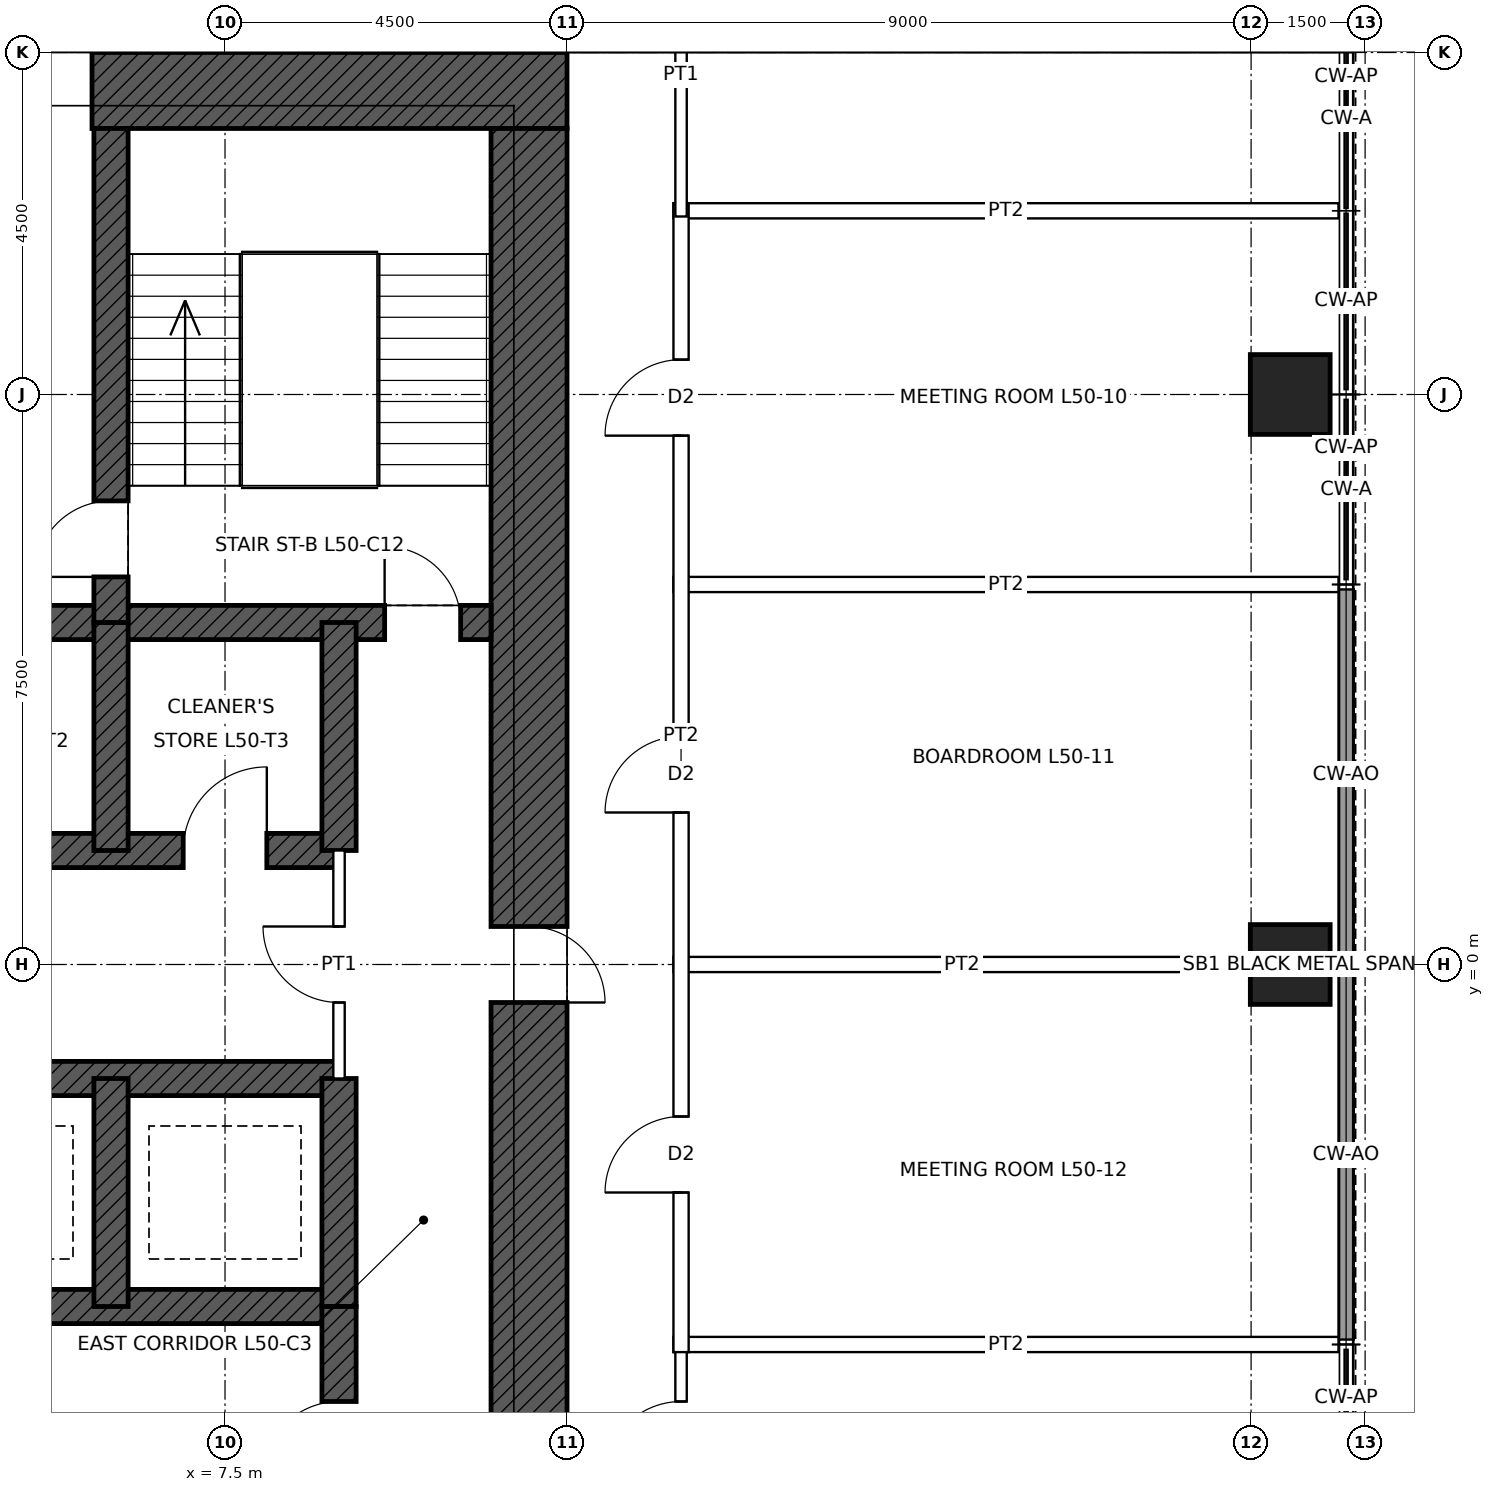
"""IFC4 building model, lengths in metres.
Left out: names, types, materials, properties, quantities, classifications, styles, units other than length and angle.
Written with IfcOpenShell. Run it as: python <this file> out.ifc"""

import sys

from ifc_helpers import new_model, si_unit, direction, frame, frame_2d, origin, origin_2d, place, context, subcontext, project, spatial, rectangle, hollow_rectangle, extrude, element, fill, save


model = new_model("IFC4")
c1 = context("Model", 3, precision=1e-05, world=origin(), true_north=direction((0.0, 1.0)))
c2 = subcontext(c1, "Body", "Model", "MODEL_VIEW")
j1 = project(units=[si_unit("LENGTHUNIT", "METRE"), si_unit("PLANEANGLEUNIT", "RADIAN")], contexts=[c1])
p1 = place(None, origin())
s1 = spatial("IfcSite", under=j1, at=p1, CompositionType="ELEMENT")
p2 = place(p1, origin())
s2 = spatial("IfcBuilding", under=s1, at=p2, CompositionType="ELEMENT")
p3 = place(p2, frame((0.0, 0.0, 233.9)))
s3 = spatial("IfcBuildingStorey", under=s2, at=p3, CompositionType="ELEMENT", Elevation=233.9)
for number, where, z_axis, x_axis in (
    (1, (21.515, 7.5, 0.0), (0.0, 0.0, 1.0), (1.0, 0.0, 0.0)),
    (2, (21.515, 0.0, 0.0), (0.0, 0.0, 1.0), (1.0, 0.0, 0.0)),
):
    element("IfcColumn", number, at=place(p3, frame(where, z_axis=z_axis, x_axis=x_axis)), inside=s3, PredefinedType="COLUMN", context=c2, shape_type="SweptSolid", body=[
        extrude(hollow_rectangle(XDim=1.05, YDim=1.05, WallThickness=0.07, at=origin_2d()), origin(), (0.0, 0.0, 1.0), 4.0),
    ])
p4 = place(p3, frame((-12.0, 11.5, 0.0), z_axis=(0.0, 0.0, 1.0), x_axis=(1.0, 0.0, 0.0)))
e3 = element("IfcWall", 3, at=p4, inside=s3, PredefinedType="SHEAR", context=c2, shape_type="SweptSolid", body=[
    extrude(rectangle(XDim=24.0, YDim=1.0, at=frame_2d((12.0, 0.0))), origin(), (0.0, 0.0, 1.0), 4.0),
])
p5 = place(p4, frame((6.25, 0.0, 0.0)))
e4 = element("IfcOpeningElement", 4, at=p5, cuts=e3, PredefinedType="OPENING", context=c2, shape_type="SweptSolid", body=[
    extrude(rectangle(XDim=1.0, YDim=2.4, at=frame_2d((0.5, 1.2))), frame((0.0, 0.51, 0.0), z_axis=(0.0, -1.0, 0.0), x_axis=(1.0, 0.0, 0.0)), (0.0, 0.0, 1.0), 1.02),
])
p6 = place(p4, frame((16.75, 0.0, 0.0)))
e5 = element("IfcOpeningElement", 5, at=p6, cuts=e3, PredefinedType="OPENING", context=c2, shape_type="SweptSolid", body=[
    extrude(rectangle(XDim=1.0, YDim=2.4, at=frame_2d((0.5, 1.2))), frame((0.0, 0.51, 0.0), z_axis=(0.0, -1.0, 0.0), x_axis=(1.0, 0.0, 0.0)), (0.0, 0.0, 1.0), 1.02),
])
p7 = place(p3, frame((11.5, 11.0, 0.0), z_axis=(0.0, 0.0, 1.0), x_axis=(0.0, -1.0, 0.0)))
e6 = element("IfcWall", 6, at=p7, inside=s3, PredefinedType="SHEAR", context=c2, shape_type="SweptSolid", body=[
    extrude(rectangle(XDim=22.0, YDim=1.0, at=frame_2d((11.0, 0.0))), origin(), (0.0, 0.0, 1.0), 4.0),
])
p8 = place(p7, frame((10.5, 0.0, 0.0)))
e7 = element("IfcOpeningElement", 7, at=p8, cuts=e6, PredefinedType="OPENING", context=c2, shape_type="SweptSolid", body=[
    extrude(rectangle(XDim=1.0, YDim=2.4, at=frame_2d((0.5, 1.2))), frame((0.0, 0.51, 0.0), z_axis=(0.0, -1.0, 0.0), x_axis=(1.0, 0.0, 0.0)), (0.0, 0.0, 1.0), 1.02),
])
p9 = place(p3, frame((-11.0, 4.5, 0.0), z_axis=(0.0, 0.0, 1.0), x_axis=(1.0, 0.0, 0.0)))
e8 = element("IfcWall", 8, at=p9, inside=s3, PredefinedType="SHEAR", context=c2, shape_type="SweptSolid", body=[
    extrude(rectangle(XDim=22.0, YDim=0.45, at=frame_2d((11.0, 0.0))), origin(), (0.0, 0.0, 1.0), 4.0),
])
p10 = place(p9, frame((0.4, 0.0, 0.0)))
e9 = element("IfcOpeningElement", 9, at=p10, cuts=e8, PredefinedType="OPENING", context=c2, shape_type="SweptSolid", body=[
    extrude(rectangle(XDim=1.0, YDim=2.1, at=frame_2d((0.5, 1.05))), frame((0.0, 0.235, 0.0), z_axis=(0.0, -1.0, 0.0), x_axis=(1.0, 0.0, 0.0)), (0.0, 0.0, 1.0), 0.47),
])
p11 = place(p9, frame((20.6, 0.0, 0.0)))
e10 = element("IfcOpeningElement", 10, at=p11, cuts=e8, PredefinedType="OPENING", context=c2, shape_type="SweptSolid", body=[
    extrude(rectangle(XDim=1.0, YDim=2.1, at=frame_2d((0.5, 1.05))), frame((0.0, 0.235, 0.0), z_axis=(0.0, -1.0, 0.0), x_axis=(1.0, 0.0, 0.0)), (0.0, 0.0, 1.0), 0.47),
])
p12 = place(p3, frame((-9.0, 1.5, 0.0), z_axis=(0.0, 0.0, 1.0), x_axis=(1.0, 0.0, 0.0)))
e11 = element("IfcWall", 11, at=p12, inside=s3, PredefinedType="SHEAR", context=c2, shape_type="SweptSolid", body=[
    extrude(rectangle(XDim=18.0, YDim=0.45, at=frame_2d((9.0, 0.0))), origin(), (0.0, 0.0, 1.0), 4.0),
])
p13 = place(p12, frame((0.95, 0.0, 0.0)))
e12 = element("IfcOpeningElement", 12, at=p13, cuts=e11, PredefinedType="OPENING", context=c2, shape_type="SweptSolid", body=[
    extrude(rectangle(XDim=1.1, YDim=2.1, at=frame_2d((0.55, 1.05))), frame((0.0, 0.235, 0.0), z_axis=(0.0, -1.0, 0.0), x_axis=(1.0, 0.0, 0.0)), (0.0, 0.0, 1.0), 0.47),
])
p14 = place(p12, frame((3.95, 0.0, 0.0)))
e13 = element("IfcOpeningElement", 13, at=p14, cuts=e11, PredefinedType="OPENING", context=c2, shape_type="SweptSolid", body=[
    extrude(rectangle(XDim=1.1, YDim=2.1, at=frame_2d((0.55, 1.05))), frame((0.0, 0.235, 0.0), z_axis=(0.0, -1.0, 0.0), x_axis=(1.0, 0.0, 0.0)), (0.0, 0.0, 1.0), 0.47),
])
p15 = place(p12, frame((6.95, 0.0, 0.0)))
e14 = element("IfcOpeningElement", 14, at=p15, cuts=e11, PredefinedType="OPENING", context=c2, shape_type="SweptSolid", body=[
    extrude(rectangle(XDim=1.1, YDim=2.1, at=frame_2d((0.55, 1.05))), frame((0.0, 0.235, 0.0), z_axis=(0.0, -1.0, 0.0), x_axis=(1.0, 0.0, 0.0)), (0.0, 0.0, 1.0), 0.47),
])
p16 = place(p12, frame((9.95, 0.0, 0.0)))
e15 = element("IfcOpeningElement", 15, at=p16, cuts=e11, PredefinedType="OPENING", context=c2, shape_type="SweptSolid", body=[
    extrude(rectangle(XDim=1.1, YDim=2.1, at=frame_2d((0.55, 1.05))), frame((0.0, 0.235, 0.0), z_axis=(0.0, -1.0, 0.0), x_axis=(1.0, 0.0, 0.0)), (0.0, 0.0, 1.0), 0.47),
])
p17 = place(p12, frame((12.95, 0.0, 0.0)))
e16 = element("IfcOpeningElement", 16, at=p17, cuts=e11, PredefinedType="OPENING", context=c2, shape_type="SweptSolid", body=[
    extrude(rectangle(XDim=1.1, YDim=2.1, at=frame_2d((0.55, 1.05))), frame((0.0, 0.235, 0.0), z_axis=(0.0, -1.0, 0.0), x_axis=(1.0, 0.0, 0.0)), (0.0, 0.0, 1.0), 0.47),
])
p18 = place(p12, frame((15.95, 0.0, 0.0)))
e17 = element("IfcOpeningElement", 17, at=p18, cuts=e11, PredefinedType="OPENING", context=c2, shape_type="SweptSolid", body=[
    extrude(rectangle(XDim=1.1, YDim=2.1, at=frame_2d((0.55, 1.05))), frame((0.0, 0.235, 0.0), z_axis=(0.0, -1.0, 0.0), x_axis=(1.0, 0.0, 0.0)), (0.0, 0.0, 1.0), 0.47),
])
p19 = place(p3, frame((-9.0, -1.5, 0.0), z_axis=(0.0, 0.0, 1.0), x_axis=(1.0, 0.0, 0.0)))
e18 = element("IfcWall", 18, at=p19, inside=s3, PredefinedType="SHEAR", context=c2, shape_type="SweptSolid", body=[
    extrude(rectangle(XDim=18.0, YDim=0.45, at=frame_2d((9.0, 0.0))), origin(), (0.0, 0.0, 1.0), 4.0),
])
p20 = place(p19, frame((0.95, 0.0, 0.0)))
e19 = element("IfcOpeningElement", 19, at=p20, cuts=e18, PredefinedType="OPENING", context=c2, shape_type="SweptSolid", body=[
    extrude(rectangle(XDim=1.1, YDim=2.1, at=frame_2d((0.55, 1.05))), frame((0.0, 0.235, 0.0), z_axis=(0.0, -1.0, 0.0), x_axis=(1.0, 0.0, 0.0)), (0.0, 0.0, 1.0), 0.47),
])
p21 = place(p19, frame((3.95, 0.0, 0.0)))
e20 = element("IfcOpeningElement", 20, at=p21, cuts=e18, PredefinedType="OPENING", context=c2, shape_type="SweptSolid", body=[
    extrude(rectangle(XDim=1.1, YDim=2.1, at=frame_2d((0.55, 1.05))), frame((0.0, 0.235, 0.0), z_axis=(0.0, -1.0, 0.0), x_axis=(1.0, 0.0, 0.0)), (0.0, 0.0, 1.0), 0.47),
])
p22 = place(p19, frame((6.95, 0.0, 0.0)))
e21 = element("IfcOpeningElement", 21, at=p22, cuts=e18, PredefinedType="OPENING", context=c2, shape_type="SweptSolid", body=[
    extrude(rectangle(XDim=1.1, YDim=2.1, at=frame_2d((0.55, 1.05))), frame((0.0, 0.235, 0.0), z_axis=(0.0, -1.0, 0.0), x_axis=(1.0, 0.0, 0.0)), (0.0, 0.0, 1.0), 0.47),
])
p23 = place(p3, frame((-9.0, -4.5, 0.0), z_axis=(0.0, 0.0, 1.0), x_axis=(1.0, 0.0, 0.0)))
e22 = element("IfcWall", 22, at=p23, inside=s3, PredefinedType="SHEAR", context=c2, shape_type="SweptSolid", body=[
    extrude(rectangle(XDim=18.0, YDim=0.45, at=frame_2d((9.0, 0.0))), origin(), (0.0, 0.0, 1.0), 4.0),
])
for number, where, z_axis, x_axis in (
    (23, (9.0, 1.5, 0.0), (0.0, 0.0, 1.0), (0.0, 1.0, 0.0)),
    (24, (9.0, -4.5, 0.0), (0.0, 0.0, 1.0), (0.0, 1.0, 0.0)),
    (25, (6.0, 1.5, 0.0), (0.0, 0.0, 1.0), (0.0, 1.0, 0.0)),
    (26, (6.0, -4.5, 0.0), (0.0, 0.0, 1.0), (0.0, 1.0, 0.0)),
):
    element("IfcWall", number, at=place(p3, frame(where, z_axis=z_axis, x_axis=x_axis)), inside=s3, PredefinedType="SHEAR", context=c2, shape_type="SweptSolid", body=[
        extrude(rectangle(XDim=3.0, YDim=0.45, at=frame_2d((1.5, 0.0))), origin(), (0.0, 0.0, 1.0), 4.0),
    ])
p24 = place(p3, frame((6.0, 4.5, 0.0), z_axis=(0.0, 0.0, 1.0), x_axis=(0.0, 1.0, 0.0)))
e27 = element("IfcWall", 27, at=p24, inside=s3, PredefinedType="SHEAR", context=c2, shape_type="SweptSolid", body=[
    extrude(rectangle(XDim=6.5, YDim=0.45, at=frame_2d((3.25, 0.0))), origin(), (0.0, 0.0, 1.0), 4.0),
])
p25 = place(p24, frame((0.6, 0.0, 0.0)))
e28 = element("IfcOpeningElement", 28, at=p25, cuts=e27, PredefinedType="OPENING", context=c2, shape_type="SweptSolid", body=[
    extrude(rectangle(XDim=1.0, YDim=2.1, at=frame_2d((0.5, 1.05))), frame((0.0, 0.235, 0.0), z_axis=(0.0, -1.0, 0.0), x_axis=(1.0, 0.0, 0.0)), (0.0, 0.0, 1.0), 0.47),
])
p26 = place(p3, frame((9.0, -11.0, 0.0), z_axis=(0.0, 0.0, 1.0), x_axis=(0.0, 1.0, 0.0)))
e29 = element("IfcWall", 29, at=p26, inside=s3, PredefinedType="SHEAR", context=c2, shape_type="SweptSolid", body=[
    extrude(rectangle(XDim=6.5, YDim=0.45, at=frame_2d((3.25, 0.0))), origin(), (0.0, 0.0, 1.0), 4.0),
])
p27 = place(p26, frame((4.25, 0.0, 0.0)))
e30 = element("IfcOpeningElement", 30, at=p27, cuts=e29, PredefinedType="OPENING", context=c2, shape_type="SweptSolid", body=[
    extrude(rectangle(XDim=1.0, YDim=2.1, at=frame_2d((0.5, 1.05))), frame((0.0, 0.235, 0.0), z_axis=(0.0, -1.0, 0.0), x_axis=(1.0, 0.0, 0.0)), (0.0, 0.0, 1.0), 0.47),
])
for number, where, z_axis, x_axis in (
    (31, (22.25, 4.935, 0.0), (0.0, 0.0, 1.0), (0.0, -1.0, 0.0)),
    (32, (22.25, 2.468, 0.0), (0.0, 0.0, 1.0), (0.0, -1.0, 0.0)),
    (33, (22.25, -0.065, 0.0), (0.0, 0.0, 1.0), (0.0, -1.0, 0.0)),
    (34, (22.25, -2.532, 0.0), (0.0, 0.0, 1.0), (0.0, -1.0, 0.0)),
):
    element("IfcWall", number, at=place(p3, frame(where, z_axis=z_axis, x_axis=x_axis)), inside=s3, PredefinedType="SOLIDWALL", context=c2, shape_type="SweptSolid", body=[
        extrude(rectangle(XDim=2.403, YDim=0.2, at=frame_2d((1.201, 0.0))), origin(), (0.0, 0.0, 1.0), 3.85),
    ])
p28 = place(p3, frame((13.4, -5.0, 0.0), z_axis=(0.0, 0.0, 1.0), x_axis=(1.0, 0.0, 0.0)))
e35 = element("IfcWall", 35, at=p28, inside=s3, PredefinedType="PARTITIONING", context=c2, shape_type="SweptSolid", body=[
    extrude(rectangle(XDim=8.75, YDim=0.2, at=frame_2d((4.375, 0.0))), origin(), (0.0, 0.0, 1.0), 3.85),
])
p29 = place(p3, frame((13.4, 0.0, 0.0), z_axis=(0.0, 0.0, 1.0), x_axis=(1.0, 0.0, 0.0)))
e36 = element("IfcWall", 36, at=p29, inside=s3, PredefinedType="PARTITIONING", context=c2, shape_type="SweptSolid", body=[
    extrude(rectangle(XDim=7.59, YDim=0.2, at=frame_2d((3.795, 0.0))), origin(), (0.0, 0.0, 1.0), 3.238),
])
for number, where, z_axis, x_axis in (
    (37, (13.4, 5.0, 0.0), (0.0, 0.0, 1.0), (1.0, 0.0, 0.0)),
    (38, (13.4, 9.917, 0.0), (0.0, 0.0, 1.0), (1.0, 0.0, 0.0)),
):
    element("IfcWall", number, at=place(p3, frame(where, z_axis=z_axis, x_axis=x_axis)), inside=s3, PredefinedType="PARTITIONING", context=c2, shape_type="SweptSolid", body=[
        extrude(rectangle(XDim=8.75, YDim=0.2, at=frame_2d((4.375, 0.0))), origin(), (0.0, 0.0, 1.0), 3.85),
    ])
p30 = place(p3, frame((13.5, -13.575, 0.0), z_axis=(0.0, 0.0, 1.0), x_axis=(0.0, 1.0, 0.0)))
e39 = element("IfcWall", 39, at=p30, inside=s3, PredefinedType="PARTITIONING", context=c2, shape_type="SweptSolid", body=[
    extrude(rectangle(XDim=8.65, YDim=0.15, at=frame_2d((4.325, 0.0))), origin(), (0.0, 0.0, 1.0), 3.85),
])
p31 = place(p30, frame((6.825, 0.0, 0.0)))
e40 = element("IfcOpeningElement", 40, at=p31, cuts=e39, PredefinedType="OPENING", context=c2, shape_type="SweptSolid", body=[
    extrude(rectangle(XDim=1.0, YDim=2.1, at=frame_2d((0.5, 1.05))), frame((0.0, 0.085, 0.0), z_axis=(0.0, -1.0, 0.0), x_axis=(1.0, 0.0, 0.0)), (0.0, 0.0, 1.0), 0.17),
])
p32 = place(p30, frame((4.366, 0.0, 0.0)))
e41 = element("IfcOpeningElement", 41, at=p32, cuts=e39, PredefinedType="OPENING", context=c2, shape_type="SweptSolid", body=[
    extrude(rectangle(XDim=1.0, YDim=2.1, at=frame_2d((0.5, 1.05))), frame((0.0, 0.085, 0.0), z_axis=(0.0, -1.0, 0.0), x_axis=(1.0, 0.0, 0.0)), (0.0, 0.0, 1.0), 0.17),
])
p33 = place(p3, frame((13.5, -5.1, 0.0), z_axis=(0.0, 0.0, 1.0), x_axis=(0.0, 1.0, 0.0)))
e42 = element("IfcWall", 42, at=p33, inside=s3, PredefinedType="PARTITIONING", context=c2, shape_type="SweptSolid", body=[
    extrude(rectangle(XDim=15.117, YDim=0.2, at=frame_2d((7.559, 0.0))), origin(), (0.0, 0.0, 1.0), 3.85),
])
p34 = place(p33, frame((12.059, 0.0, 0.0)))
e43 = element("IfcOpeningElement", 43, at=p34, cuts=e42, PredefinedType="OPENING", context=c2, shape_type="SweptSolid", body=[
    extrude(rectangle(XDim=1.0, YDim=2.1, at=frame_2d((0.5, 1.05))), frame((0.0, 0.11, 0.0), z_axis=(0.0, -1.0, 0.0), x_axis=(1.0, 0.0, 0.0)), (0.0, 0.0, 1.0), 0.22),
])
p35 = place(p33, frame((7.1, 0.0, 0.0)))
e44 = element("IfcOpeningElement", 44, at=p35, cuts=e42, PredefinedType="OPENING", context=c2, shape_type="SweptSolid", body=[
    extrude(rectangle(XDim=1.0, YDim=2.1, at=frame_2d((0.5, 1.05))), frame((0.0, 0.11, 0.0), z_axis=(0.0, -1.0, 0.0), x_axis=(1.0, 0.0, 0.0)), (0.0, 0.0, 1.0), 0.22),
])
p36 = place(p33, frame((2.1, 0.0, 0.0)))
e45 = element("IfcOpeningElement", 45, at=p36, cuts=e42, PredefinedType="OPENING", context=c2, shape_type="SweptSolid", body=[
    extrude(rectangle(XDim=1.0, YDim=2.1, at=frame_2d((0.5, 1.05))), frame((0.0, 0.11, 0.0), z_axis=(0.0, -1.0, 0.0), x_axis=(1.0, 0.0, 0.0)), (0.0, 0.0, 1.0), 0.22),
])
p37 = place(p3, frame((13.5, 9.842, 0.0), z_axis=(0.0, 0.0, 1.0), x_axis=(0.0, 1.0, 0.0)))
e46 = element("IfcWall", 46, at=p37, inside=s3, PredefinedType="PARTITIONING", context=c2, shape_type="SweptSolid", body=[
    extrude(rectangle(XDim=3.733, YDim=0.15, at=frame_2d((1.866, 0.0))), origin(), (0.0, 0.0, 1.0), 3.85),
])
p38 = place(p3, frame((9.0, -1.5, 0.0), z_axis=(0.0, 0.0, 1.0), x_axis=(0.0, 1.0, 0.0)))
e47 = element("IfcWall", 47, at=p38, inside=s3, PredefinedType="PARTITIONING", context=c2, shape_type="SweptSolid", body=[
    extrude(rectangle(XDim=3.0, YDim=0.15, at=frame_2d((1.5, 0.0))), origin(), (0.0, 0.0, 1.0), 3.75),
])
p39 = place(p38, frame((1.0, 0.0, 0.0)))
e48 = element("IfcOpeningElement", 48, at=p39, cuts=e47, PredefinedType="OPENING", context=c2, shape_type="SweptSolid", body=[
    extrude(rectangle(XDim=1.0, YDim=2.4, at=frame_2d((0.5, 1.2))), frame((0.0, 0.085, 0.0), z_axis=(0.0, -1.0, 0.0), x_axis=(1.0, 0.0, 0.0)), (0.0, 0.0, 1.0), 0.17),
])
p40 = place(p11, origin())
e49 = element("IfcDoor", 49, at=p40, inside=s3, OperationType="SINGLE_SWING_LEFT", PredefinedType="DOOR", context=c2, shape_type="SweptSolid", body=[
    extrude(rectangle(XDim=1.0, YDim=2.1, at=frame_2d((0.5, 1.05))), frame((0.0, 0.025, 0.0), z_axis=(0.0, -1.0, 0.0), x_axis=(1.0, 0.0, 0.0)), (0.0, 0.0, 1.0), 0.05),
])
fill(e10, e49)
p41 = place(p25, origin())
e50 = element("IfcDoor", 50, at=p41, inside=s3, OperationType="SINGLE_SWING_LEFT", PredefinedType="DOOR", context=c2, shape_type="SweptSolid", body=[
    extrude(rectangle(XDim=1.0, YDim=2.1, at=frame_2d((0.5, 1.05))), frame((0.0, 0.025, 0.0), z_axis=(0.0, -1.0, 0.0), x_axis=(1.0, 0.0, 0.0)), (0.0, 0.0, 1.0), 0.05),
])
fill(e28, e50)
p42 = place(p6, origin())
e51 = element("IfcDoor", 51, at=p42, inside=s3, OperationType="SINGLE_SWING_RIGHT", PredefinedType="DOOR", context=c2, shape_type="SweptSolid", body=[
    extrude(rectangle(XDim=1.0, YDim=2.4, at=frame_2d((0.5, 1.2))), frame((0.0, 0.485, 0.0), z_axis=(0.0, -1.0, 0.0), x_axis=(1.0, 0.0, 0.0)), (0.0, 0.0, 1.0), 0.05),
])
fill(e5, e51)
p43 = place(p8, origin())
e52 = element("IfcDoor", 52, at=p43, inside=s3, OperationType="SINGLE_SWING_RIGHT", PredefinedType="DOOR", context=c2, shape_type="SweptSolid", body=[
    extrude(rectangle(XDim=1.0, YDim=2.4, at=frame_2d((0.5, 1.2))), frame((0.0, 0.485, 0.0), z_axis=(0.0, -1.0, 0.0), x_axis=(1.0, 0.0, 0.0)), (0.0, 0.0, 1.0), 0.05),
])
fill(e7, e52)
p44 = place(p27, origin())
e53 = element("IfcDoor", 53, at=p44, inside=s3, OperationType="SINGLE_SWING_LEFT", PredefinedType="DOOR", context=c2, shape_type="SweptSolid", body=[
    extrude(rectangle(XDim=1.0, YDim=2.1, at=frame_2d((0.5, 1.05))), frame((0.0, 0.025, 0.0), z_axis=(0.0, -1.0, 0.0), x_axis=(1.0, 0.0, 0.0)), (0.0, 0.0, 1.0), 0.05),
])
fill(e30, e53)
p45 = place(p39, origin())
e54 = element("IfcDoor", 54, at=p45, inside=s3, OperationType="SINGLE_SWING_RIGHT", PredefinedType="DOOR", context=c2, shape_type="SweptSolid", body=[
    extrude(rectangle(XDim=1.0, YDim=2.4, at=frame_2d((0.5, 1.2))), frame((0.0, 0.025, 0.0), z_axis=(0.0, -1.0, 0.0), x_axis=(1.0, 0.0, 0.0)), (0.0, 0.0, 1.0), 0.05),
])
fill(e48, e54)
p46 = place(p18, origin())
e55 = element("IfcDoor", 55, at=p46, inside=s3, OperationType="SINGLE_SWING_RIGHT", PredefinedType="DOOR", context=c2, shape_type="SweptSolid", body=[
    extrude(rectangle(XDim=1.1, YDim=2.1, at=frame_2d((0.55, 1.05))), frame((0.0, 0.025, 0.0), z_axis=(0.0, -1.0, 0.0), x_axis=(1.0, 0.0, 0.0)), (0.0, 0.0, 1.0), 0.05),
])
fill(e17, e55)
p47 = place(p34, origin())
e56 = element("IfcDoor", 56, at=p47, inside=s3, OperationType="SINGLE_SWING_LEFT", PredefinedType="DOOR", context=c2, shape_type="SweptSolid", body=[
    extrude(rectangle(XDim=1.0, YDim=2.1, at=frame_2d((0.5, 1.05))), frame((0.0, 0.025, 0.0), z_axis=(0.0, -1.0, 0.0), x_axis=(1.0, 0.0, 0.0)), (0.0, 0.0, 1.0), 0.05),
])
fill(e43, e56)
p48 = place(p35, origin())
e57 = element("IfcDoor", 57, at=p48, inside=s3, OperationType="SINGLE_SWING_LEFT", PredefinedType="DOOR", context=c2, shape_type="SweptSolid", body=[
    extrude(rectangle(XDim=1.0, YDim=2.1, at=frame_2d((0.5, 1.05))), frame((0.0, 0.025, 0.0), z_axis=(0.0, -1.0, 0.0), x_axis=(1.0, 0.0, 0.0)), (0.0, 0.0, 1.0), 0.05),
])
fill(e44, e57)
p49 = place(p36, origin())
e58 = element("IfcDoor", 58, at=p49, inside=s3, OperationType="SINGLE_SWING_LEFT", PredefinedType="DOOR", context=c2, shape_type="SweptSolid", body=[
    extrude(rectangle(XDim=1.0, YDim=2.1, at=frame_2d((0.5, 1.05))), frame((0.0, 0.025, 0.0), z_axis=(0.0, -1.0, 0.0), x_axis=(1.0, 0.0, 0.0)), (0.0, 0.0, 1.0), 0.05),
])
fill(e45, e58)
p50 = place(p31, origin())
e59 = element("IfcDoor", 59, at=p50, inside=s3, OperationType="SINGLE_SWING_LEFT", PredefinedType="DOOR", context=c2, shape_type="SweptSolid", body=[
    extrude(rectangle(XDim=1.0, YDim=2.1, at=frame_2d((0.5, 1.05))), frame((0.0, 0.025, 0.0), z_axis=(0.0, -1.0, 0.0), x_axis=(1.0, 0.0, 0.0)), (0.0, 0.0, 1.0), 0.05),
])
fill(e40, e59)
save(model, sys.argv[1])
